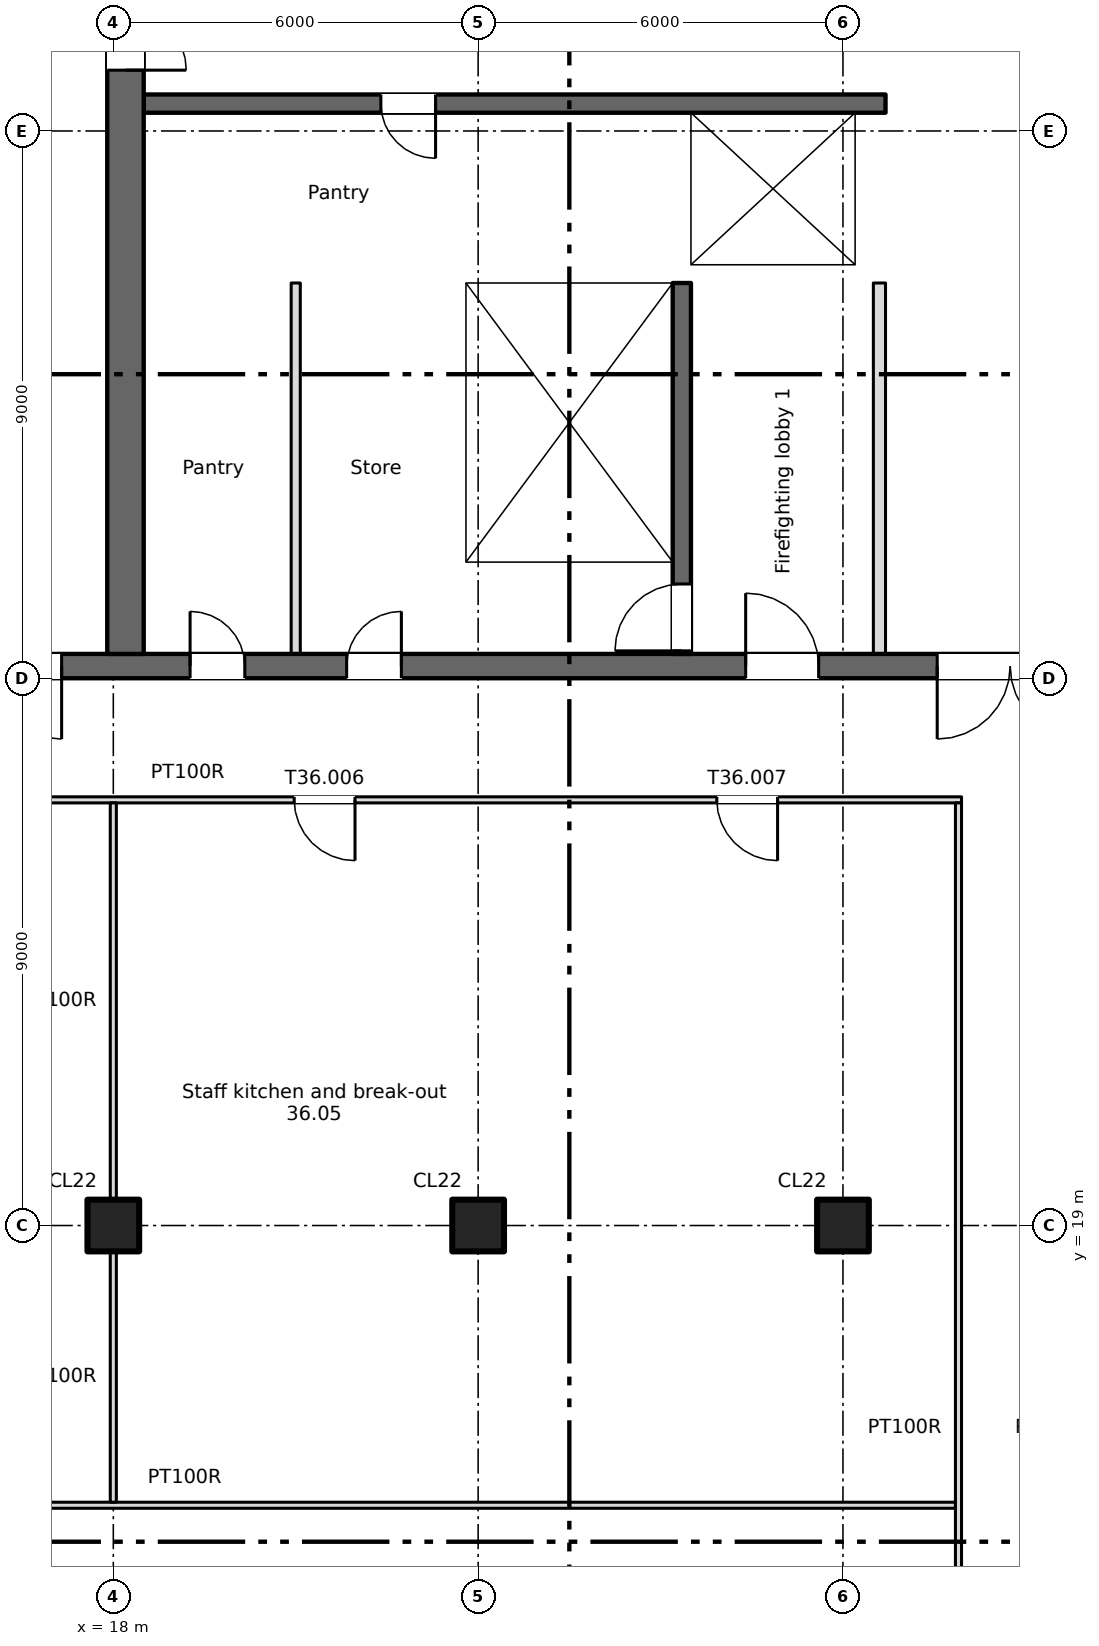
"""IFC4 building model, lengths in metres.
Left out: names, types, materials, properties, quantities, classifications, styles, units other than length and angle.
Written with IfcOpenShell. Run it as: python <this file> out.ifc"""

import sys

from ifc_helpers import new_model, si_unit, direction, frame, frame_2d, origin, origin_2d, place, context, subcontext, project, spatial, rectangle, extrude, element, fill, save


model = new_model("IFC4")
c1 = context("Model", 3, precision=1e-05, world=origin(), true_north=direction((0.0, 1.0)))
c2 = subcontext(c1, "Body", "Model", "MODEL_VIEW")
j1 = project(units=[si_unit("LENGTHUNIT", "METRE"), si_unit("PLANEANGLEUNIT", "RADIAN")], contexts=[c1])
p1 = place(None, origin())
s1 = spatial("IfcSite", under=j1, at=p1, CompositionType="ELEMENT")
p2 = place(p1, origin())
s2 = spatial("IfcBuilding", under=s1, at=p2, CompositionType="ELEMENT")
p3 = place(p2, frame((0.0, 0.0, 250.75)))
s3 = spatial("IfcBuildingStorey", under=s2, at=p3, CompositionType="ELEMENT", Elevation=250.75)
for number, where, z_axis, x_axis in (
    (1, (18.0, 19.0, 0.0), (0.0, 0.0, 1.0), (1.0, 0.0, 0.0)),
    (2, (24.0, 19.0, 0.0), (0.0, 0.0, 1.0), (1.0, 0.0, 0.0)),
    (3, (30.0, 19.0, 0.0), (0.0, 0.0, 1.0), (1.0, 0.0, 0.0)),
):
    element("IfcColumn", number, at=place(p3, frame(where, z_axis=z_axis, x_axis=x_axis)), inside=s3, PredefinedType="COLUMN", context=c2, shape_type="SweptSolid", body=[
        extrude(rectangle(XDim=0.85, YDim=0.85, at=origin_2d()), origin(), (0.0, 0.0, 1.0), 3.4),
    ])
p4 = place(p3, frame((6.5, 28.2, 0.0), z_axis=(0.0, 0.0, 1.0), x_axis=(1.0, 0.0, 0.0)))
e4 = element("IfcWall", 4, at=p4, inside=s3, PredefinedType="SHEAR", context=c2, shape_type="SweptSolid", body=[
    extrude(rectangle(XDim=58.0, YDim=0.4, at=frame_2d((29.0, 0.0))), origin(), (0.0, 0.0, 1.0), 3.4),
])
p5 = place(p4, frame((12.762, 0.0, 0.0)))
e5 = element("IfcOpeningElement", 5, at=p5, cuts=e4, PredefinedType="OPENING", context=c2, shape_type="SweptSolid", body=[
    extrude(rectangle(XDim=0.9, YDim=2.1, at=frame_2d((0.45, 1.05))), frame((0.0, 0.21, 0.0), z_axis=(0.0, -1.0, 0.0), x_axis=(1.0, 0.0, 0.0)), (0.0, 0.0, 1.0), 0.42),
])
p6 = place(p4, frame((15.337, 0.0, 0.0)))
e6 = element("IfcOpeningElement", 6, at=p6, cuts=e4, PredefinedType="OPENING", context=c2, shape_type="SweptSolid", body=[
    extrude(rectangle(XDim=0.9, YDim=2.1, at=frame_2d((0.45, 1.05))), frame((0.0, 0.21, 0.0), z_axis=(0.0, -1.0, 0.0), x_axis=(1.0, 0.0, 0.0)), (0.0, 0.0, 1.0), 0.42),
])
p7 = place(p4, frame((50.05, 0.0, 0.0)))
e7 = element("IfcOpeningElement", 7, at=p7, cuts=e4, PredefinedType="OPENING", context=c2, shape_type="SweptSolid", body=[
    extrude(rectangle(XDim=0.9, YDim=2.1, at=frame_2d((0.45, 1.05))), frame((0.0, 0.21, 0.0), z_axis=(0.0, -1.0, 0.0), x_axis=(1.0, 0.0, 0.0)), (0.0, 0.0, 1.0), 0.42),
])
p8 = place(p4, frame((0.762, 0.0, 0.0)))
e8 = element("IfcOpeningElement", 8, at=p8, cuts=e4, PredefinedType="OPENING", context=c2, shape_type="SweptSolid", body=[
    extrude(rectangle(XDim=0.9, YDim=2.1, at=frame_2d((0.45, 1.05))), frame((0.0, 0.21, 0.0), z_axis=(0.0, -1.0, 0.0), x_axis=(1.0, 0.0, 0.0)), (0.0, 0.0, 1.0), 0.42),
])
p9 = place(p4, frame((2.337, 0.0, 0.0)))
e9 = element("IfcOpeningElement", 9, at=p9, cuts=e4, PredefinedType="OPENING", context=c2, shape_type="SweptSolid", body=[
    extrude(rectangle(XDim=0.9, YDim=2.1, at=frame_2d((0.45, 1.05))), frame((0.0, 0.21, 0.0), z_axis=(0.0, -1.0, 0.0), x_axis=(1.0, 0.0, 0.0)), (0.0, 0.0, 1.0), 0.42),
])
p10 = place(p4, frame((4.9, 0.0, 0.0)))
e10 = element("IfcOpeningElement", 10, at=p10, cuts=e4, PredefinedType="OPENING", context=c2, shape_type="SweptSolid", body=[
    extrude(rectangle(XDim=1.2, YDim=2.1, at=frame_2d((0.6, 1.05))), frame((0.0, 0.21, 0.0), z_axis=(0.0, -1.0, 0.0), x_axis=(1.0, 0.0, 0.0)), (0.0, 0.0, 1.0), 0.42),
])
p11 = place(p4, frame((31.9, 0.0, 0.0)))
e11 = element("IfcOpeningElement", 11, at=p11, cuts=e4, PredefinedType="OPENING", context=c2, shape_type="SweptSolid", body=[
    extrude(rectangle(XDim=1.2, YDim=2.1, at=frame_2d((0.6, 1.05))), frame((0.0, 0.21, 0.0), z_axis=(0.0, -1.0, 0.0), x_axis=(1.0, 0.0, 0.0)), (0.0, 0.0, 1.0), 0.42),
])
p12 = place(p4, frame((55.4, 0.0, 0.0)))
e12 = element("IfcOpeningElement", 12, at=p12, cuts=e4, PredefinedType="OPENING", context=c2, shape_type="SweptSolid", body=[
    extrude(rectangle(XDim=1.2, YDim=2.1, at=frame_2d((0.6, 1.05))), frame((0.0, 0.21, 0.0), z_axis=(0.0, -1.0, 0.0), x_axis=(1.0, 0.0, 0.0)), (0.0, 0.0, 1.0), 0.42),
])
p13 = place(p4, frame((21.9, 0.0, 0.0)))
e13 = element("IfcOpeningElement", 13, at=p13, cuts=e4, PredefinedType="OPENING", context=c2, shape_type="SweptSolid", body=[
    extrude(rectangle(XDim=1.2, YDim=2.1, at=frame_2d((0.6, 1.05))), frame((0.0, 0.21, 0.0), z_axis=(0.0, -1.0, 0.0), x_axis=(1.0, 0.0, 0.0)), (0.0, 0.0, 1.0), 0.42),
])
p14 = place(p4, frame((41.9, 0.0, 0.0)))
e14 = element("IfcOpeningElement", 14, at=p14, cuts=e4, PredefinedType="OPENING", context=c2, shape_type="SweptSolid", body=[
    extrude(rectangle(XDim=1.2, YDim=2.1, at=frame_2d((0.6, 1.05))), frame((0.0, 0.21, 0.0), z_axis=(0.0, -1.0, 0.0), x_axis=(1.0, 0.0, 0.0)), (0.0, 0.0, 1.0), 0.42),
])
p15 = place(p4, frame((25.05, 0.0, 0.0)))
e15 = element("IfcOpeningElement", 15, at=p15, cuts=e4, PredefinedType="OPENING", context=c2, shape_type="SweptSolid", body=[
    extrude(rectangle(XDim=2.4, YDim=2.1, at=frame_2d((1.2, 1.05))), frame((0.0, 0.21, 0.0), z_axis=(0.0, -1.0, 0.0), x_axis=(1.0, 0.0, 0.0)), (0.0, 0.0, 1.0), 0.42),
])
p16 = place(p4, frame((37.55, 0.0, 0.0)))
e16 = element("IfcOpeningElement", 16, at=p16, cuts=e4, PredefinedType="OPENING", context=c2, shape_type="SweptSolid", body=[
    extrude(rectangle(XDim=2.4, YDim=2.1, at=frame_2d((1.2, 1.05))), frame((0.0, 0.21, 0.0), z_axis=(0.0, -1.0, 0.0), x_axis=(1.0, 0.0, 0.0)), (0.0, 0.0, 1.0), 0.42),
])
p17 = place(p4, frame((8.25, 0.0, 0.0)))
e17 = element("IfcOpeningElement", 17, at=p17, cuts=e4, PredefinedType="OPENING", context=c2, shape_type="SweptSolid", body=[
    extrude(rectangle(XDim=2.4, YDim=2.1, at=frame_2d((1.2, 1.05))), frame((0.0, 0.21, 0.0), z_axis=(0.0, -1.0, 0.0), x_axis=(1.0, 0.0, 0.0)), (0.0, 0.0, 1.0), 0.42),
])
p18 = place(p4, frame((29.05, 0.0, 0.0)))
e18 = element("IfcOpeningElement", 18, at=p18, cuts=e4, PredefinedType="OPENING", context=c2, shape_type="SweptSolid", body=[
    extrude(rectangle(XDim=0.9, YDim=2.1, at=frame_2d((0.45, 1.05))), frame((0.0, 0.21, 0.0), z_axis=(0.0, -1.0, 0.0), x_axis=(1.0, 0.0, 0.0)), (0.0, 0.0, 1.0), 0.42),
])
p19 = place(p4, frame((35.05, 0.0, 0.0)))
e19 = element("IfcOpeningElement", 19, at=p19, cuts=e4, PredefinedType="OPENING", context=c2, shape_type="SweptSolid", body=[
    extrude(rectangle(XDim=0.9, YDim=2.1, at=frame_2d((0.45, 1.05))), frame((0.0, 0.21, 0.0), z_axis=(0.0, -1.0, 0.0), x_axis=(1.0, 0.0, 0.0)), (0.0, 0.0, 1.0), 0.42),
])
p20 = place(p3, frame((18.2, 28.4, 0.0), z_axis=(0.0, 0.0, 1.0), x_axis=(0.0, 1.0, 0.0)))
e20 = element("IfcWall", 20, at=p20, inside=s3, PredefinedType="SHEAR", context=c2, shape_type="SweptSolid", body=[
    extrude(rectangle(XDim=17.0, YDim=0.6, at=frame_2d((8.5, 0.0))), origin(), (0.0, 0.0, 1.0), 3.4),
])
p21 = place(p20, frame((9.6, 0.0, 0.0)))
e21 = element("IfcOpeningElement", 21, at=p21, cuts=e20, PredefinedType="OPENING", context=c2, shape_type="SweptSolid", body=[
    extrude(rectangle(XDim=2.0, YDim=2.1, at=frame_2d((1.0, 1.05))), frame((0.0, 0.31, 0.0), z_axis=(0.0, -1.0, 0.0), x_axis=(1.0, 0.0, 0.0)), (0.0, 0.0, 1.0), 0.62),
])
p22 = place(p20, frame((15.45, 0.0, 0.0)))
e22 = element("IfcOpeningElement", 22, at=p22, cuts=e20, PredefinedType="OPENING", context=c2, shape_type="SweptSolid", body=[
    extrude(rectangle(XDim=1.2, YDim=2.1, at=frame_2d((0.6, 1.05))), frame((0.0, 0.31, 0.0), z_axis=(0.0, -1.0, 0.0), x_axis=(1.0, 0.0, 0.0)), (0.0, 0.0, 1.0), 0.62),
])
p23 = place(p3, frame((23.65, 28.4, 0.0), z_axis=(0.0, 0.0, 1.0), x_axis=(0.0, 1.0, 0.0)))
e23 = element("IfcWall", 23, at=p23, inside=s3, PredefinedType="SHEAR", context=c2, shape_type="SweptSolid", body=[
    extrude(rectangle(XDim=6.1, YDim=0.3, at=frame_2d((3.05, 0.0))), origin(), (0.0, 0.0, 1.0), 3.4),
])
p24 = place(p3, frame((27.35, 28.4, 0.0), z_axis=(0.0, 0.0, 1.0), x_axis=(0.0, 1.0, 0.0)))
e24 = element("IfcWall", 24, at=p24, inside=s3, PredefinedType="SHEAR", context=c2, shape_type="SweptSolid", body=[
    extrude(rectangle(XDim=6.1, YDim=0.3, at=frame_2d((3.05, 0.0))), origin(), (0.0, 0.0, 1.0), 3.4),
])
p25 = place(p24, frame((0.05, 0.0, 0.0)))
e25 = element("IfcOpeningElement", 25, at=p25, cuts=e24, PredefinedType="OPENING", context=c2, shape_type="SweptSolid", body=[
    extrude(rectangle(XDim=1.1, YDim=2.1, at=frame_2d((0.55, 1.05))), frame((0.0, 0.16, 0.0), z_axis=(0.0, -1.0, 0.0), x_axis=(1.0, 0.0, 0.0)), (0.0, 0.0, 1.0), 0.32),
])
p26 = place(p3, frame((18.5, 34.65, 0.0), z_axis=(0.0, 0.0, 1.0), x_axis=(1.0, 0.0, 0.0)))
e26 = element("IfcWall", 26, at=p26, inside=s3, PredefinedType="SHEAR", context=c2, shape_type="SweptSolid", body=[
    extrude(rectangle(XDim=12.2, YDim=0.3, at=frame_2d((6.1, 0.0))), origin(), (0.0, 0.0, 1.0), 3.4),
])
p27 = place(p26, frame((9.8, 0.0, 0.0)))
e27 = element("IfcOpeningElement", 27, at=p27, cuts=e26, PredefinedType="OPENING", context=c2, shape_type="SweptSolid", body=[
    extrude(rectangle(XDim=1.1, YDim=2.1, at=frame_2d((0.55, 1.05))), frame((0.0, 0.16, 0.0), z_axis=(0.0, -1.0, 0.0), x_axis=(1.0, 0.0, 0.0)), (0.0, 0.0, 1.0), 0.32),
])
p28 = place(p3, frame((30.7, 37.45, 0.0), z_axis=(0.0, 0.0, 1.0), x_axis=(-1.0, 0.0, 0.0)))
e28 = element("IfcWall", 28, at=p28, inside=s3, PredefinedType="SHEAR", context=c2, shape_type="SweptSolid", body=[
    extrude(rectangle(XDim=12.2, YDim=0.3, at=frame_2d((6.1, 0.0))), origin(), (0.0, 0.0, 1.0), 3.4),
])
p29 = place(p28, frame((7.4, 0.0, 0.0)))
e29 = element("IfcOpeningElement", 29, at=p29, cuts=e28, PredefinedType="OPENING", context=c2, shape_type="SweptSolid", body=[
    extrude(rectangle(XDim=0.9, YDim=2.1, at=frame_2d((0.45, 1.05))), frame((0.0, 0.16, 0.0), z_axis=(0.0, -1.0, 0.0), x_axis=(1.0, 0.0, 0.0)), (0.0, 0.0, 1.0), 0.32),
])
p30 = place(p3, frame((27.35, 34.8, 0.0), z_axis=(0.0, 0.0, 1.0), x_axis=(0.0, 1.0, 0.0)))
e30 = element("IfcWall", 30, at=p30, inside=s3, PredefinedType="SHEAR", context=c2, shape_type="SweptSolid", body=[
    extrude(rectangle(XDim=2.5, YDim=0.3, at=frame_2d((1.25, 0.0))), origin(), (0.0, 0.0, 1.0), 3.4),
])
p31 = place(p3, frame((30.45, 34.8, 0.0), z_axis=(0.0, 0.0, 1.0), x_axis=(0.0, 1.0, 0.0)))
e31 = element("IfcWall", 31, at=p31, inside=s3, PredefinedType="SHEAR", context=c2, shape_type="SweptSolid", body=[
    extrude(rectangle(XDim=2.5, YDim=0.5, at=frame_2d((1.25, 0.0))), origin(), (0.0, 0.0, 1.0), 3.4),
])
p32 = place(p3, frame((30.6, 28.4, 0.0), z_axis=(0.0, 0.0, 1.0), x_axis=(0.0, 1.0, 0.0)))
e32 = element("IfcWall", 32, at=p32, inside=s3, PredefinedType="PARTITIONING", context=c2, shape_type="SweptSolid", body=[
    extrude(rectangle(XDim=6.1, YDim=0.2, at=frame_2d((3.05, 0.0))), origin(), (0.0, 0.0, 1.0), 3.4),
])
p33 = place(p3, frame((21.0, 28.4, 0.0), z_axis=(0.0, 0.0, 1.0), x_axis=(0.0, 1.0, 0.0)))
e33 = element("IfcWall", 33, at=p33, inside=s3, PredefinedType="PARTITIONING", context=c2, shape_type="SweptSolid", body=[
    extrude(rectangle(XDim=6.1, YDim=0.15, at=frame_2d((3.05, 0.0))), origin(), (0.0, 0.0, 1.0), 3.4),
])
p34 = place(p3, frame((6.5, 14.4, 0.0), z_axis=(0.0, 0.0, 1.0), x_axis=(1.0, 0.0, 0.0)))
e34 = element("IfcWall", 34, at=p34, inside=s3, PredefinedType="PARTITIONING", context=c2, shape_type="SweptSolid", body=[
    extrude(rectangle(XDim=25.35, YDim=0.1, at=frame_2d((12.675, 0.0))), origin(), (0.0, 0.0, 1.0), 3.4),
])
p35 = place(p3, frame((6.5, 26.0, 0.0), z_axis=(0.0, 0.0, 1.0), x_axis=(1.0, 0.0, 0.0)))
e35 = element("IfcWall", 35, at=p35, inside=s3, PredefinedType="PARTITIONING", context=c2, shape_type="SweptSolid", body=[
    extrude(rectangle(XDim=25.45, YDim=0.1, at=frame_2d((12.725, 0.0))), origin(), (0.0, 0.0, 1.0), 3.4),
])
p36 = place(p35, frame((4.85, 0.0, 0.0)))
e36 = element("IfcOpeningElement", 36, at=p36, cuts=e35, PredefinedType="OPENING", context=c2, shape_type="SweptSolid", body=[
    extrude(rectangle(XDim=1.8, YDim=2.1, at=frame_2d((0.9, 1.05))), frame((0.0, 0.06, 0.0), z_axis=(0.0, -1.0, 0.0), x_axis=(1.0, 0.0, 0.0)), (0.0, 0.0, 1.0), 0.12),
])
p37 = place(p35, frame((14.475, 0.0, 0.0)))
e37 = element("IfcOpeningElement", 37, at=p37, cuts=e35, PredefinedType="OPENING", context=c2, shape_type="SweptSolid", body=[
    extrude(rectangle(XDim=1.0, YDim=2.1, at=frame_2d((0.5, 1.05))), frame((0.0, 0.06, 0.0), z_axis=(0.0, -1.0, 0.0), x_axis=(1.0, 0.0, 0.0)), (0.0, 0.0, 1.0), 0.12),
])
p38 = place(p35, frame((21.425, 0.0, 0.0)))
e38 = element("IfcOpeningElement", 38, at=p38, cuts=e35, PredefinedType="OPENING", context=c2, shape_type="SweptSolid", body=[
    extrude(rectangle(XDim=1.0, YDim=2.1, at=frame_2d((0.5, 1.05))), frame((0.0, 0.06, 0.0), z_axis=(0.0, -1.0, 0.0), x_axis=(1.0, 0.0, 0.0)), (0.0, 0.0, 1.0), 0.12),
])
p39 = place(p3, frame((18.0, 14.45, 0.0), z_axis=(0.0, 0.0, 1.0), x_axis=(0.0, 1.0, 0.0)))
e39 = element("IfcWall", 39, at=p39, inside=s3, PredefinedType="PARTITIONING", context=c2, shape_type="SweptSolid", body=[
    extrude(rectangle(XDim=4.125, YDim=0.1, at=frame_2d((2.062, 0.0))), origin(), (0.0, 0.0, 1.0), 3.4),
])
p40 = place(p3, frame((18.0, 19.425, 0.0), z_axis=(0.0, 0.0, 1.0), x_axis=(0.0, 1.0, 0.0)))
e40 = element("IfcWall", 40, at=p40, inside=s3, PredefinedType="PARTITIONING", context=c2, shape_type="SweptSolid", body=[
    extrude(rectangle(XDim=6.525, YDim=0.1, at=frame_2d((3.262, 0.0))), origin(), (0.0, 0.0, 1.0), 3.4),
])
p41 = place(p3, frame((31.9, 5.4, 0.0), z_axis=(0.0, 0.0, 1.0), x_axis=(0.0, 1.0, 0.0)))
e41 = element("IfcWall", 41, at=p41, inside=s3, PredefinedType="PARTITIONING", context=c2, shape_type="SweptSolid", body=[
    extrude(rectangle(XDim=20.55, YDim=0.1, at=frame_2d((10.275, 0.0))), origin(), (0.0, 0.0, 1.0), 3.4),
])
p42 = place(p41, frame((1.65, 0.0, 0.0)))
e42 = element("IfcOpeningElement", 42, at=p42, cuts=e41, PredefinedType="OPENING", context=c2, shape_type="SweptSolid", body=[
    extrude(rectangle(XDim=1.2, YDim=2.1, at=frame_2d((0.6, 1.05))), frame((0.0, 0.06, 0.0), z_axis=(0.0, -1.0, 0.0), x_axis=(1.0, 0.0, 0.0)), (0.0, 0.0, 1.0), 0.12),
])
p43 = place(p41, frame((6.15, 0.0, 0.0)))
e43 = element("IfcOpeningElement", 43, at=p43, cuts=e41, PredefinedType="OPENING", context=c2, shape_type="SweptSolid", body=[
    extrude(rectangle(XDim=1.2, YDim=2.1, at=frame_2d((0.6, 1.05))), frame((0.0, 0.06, 0.0), z_axis=(0.0, -1.0, 0.0), x_axis=(1.0, 0.0, 0.0)), (0.0, 0.0, 1.0), 0.12),
])
p44 = place(p5, origin())
e44 = element("IfcDoor", 44, at=p44, inside=s3, OperationType="SINGLE_SWING_LEFT", PredefinedType="DOOR", context=c2, shape_type="SweptSolid", body=[
    extrude(rectangle(XDim=0.9, YDim=2.1, at=frame_2d((0.45, 1.05))), frame((0.0, 0.025, 0.0), z_axis=(0.0, -1.0, 0.0), x_axis=(1.0, 0.0, 0.0)), (0.0, 0.0, 1.0), 0.05),
])
fill(e5, e44)
p45 = place(p6, origin())
e45 = element("IfcDoor", 45, at=p45, inside=s3, OperationType="SINGLE_SWING_RIGHT", PredefinedType="DOOR", context=c2, shape_type="SweptSolid", body=[
    extrude(rectangle(XDim=0.9, YDim=2.1, at=frame_2d((0.45, 1.05))), frame((0.0, 0.025, 0.0), z_axis=(0.0, -1.0, 0.0), x_axis=(1.0, 0.0, 0.0)), (0.0, 0.0, 1.0), 0.05),
])
fill(e6, e45)
p46 = place(p29, origin())
e46 = element("IfcDoor", 46, at=p46, inside=s3, OperationType="SINGLE_SWING_LEFT", PredefinedType="DOOR", context=c2, shape_type="SweptSolid", body=[
    extrude(rectangle(XDim=0.9, YDim=2.1, at=frame_2d((0.45, 1.05))), frame((0.0, 0.025, 0.0), z_axis=(0.0, -1.0, 0.0), x_axis=(1.0, 0.0, 0.0)), (0.0, 0.0, 1.0), 0.05),
])
fill(e29, e46)
p47 = place(p27, origin())
e47 = element("IfcDoor", 47, at=p47, inside=s3, OperationType="SLIDING_TO_LEFT", PredefinedType="DOOR", context=c2, shape_type="SweptSolid", body=[
    extrude(rectangle(XDim=1.1, YDim=2.1, at=frame_2d((0.55, 1.05))), frame((0.0, 0.025, 0.0), z_axis=(0.0, -1.0, 0.0), x_axis=(1.0, 0.0, 0.0)), (0.0, 0.0, 1.0), 0.05),
])
fill(e27, e47)
p48 = place(p25, origin())
e48 = element("IfcDoor", 48, at=p48, inside=s3, OperationType="SINGLE_SWING_LEFT", PredefinedType="DOOR", context=c2, shape_type="SweptSolid", body=[
    extrude(rectangle(XDim=1.1, YDim=2.1, at=frame_2d((0.55, 1.05))), frame((0.0, 0.025, 0.0), z_axis=(0.0, -1.0, 0.0), x_axis=(1.0, 0.0, 0.0)), (0.0, 0.0, 1.0), 0.05),
])
fill(e25, e48)
p49 = place(p13, origin())
e49 = element("IfcDoor", 49, at=p49, inside=s3, OperationType="SINGLE_SWING_LEFT", PredefinedType="DOOR", context=c2, shape_type="SweptSolid", body=[
    extrude(rectangle(XDim=1.2, YDim=2.1, at=frame_2d((0.6, 1.05))), frame((0.0, 0.025, 0.0), z_axis=(0.0, -1.0, 0.0), x_axis=(1.0, 0.0, 0.0)), (0.0, 0.0, 1.0), 0.05),
])
fill(e13, e49)
p50 = place(p15, origin())
e50 = element("IfcDoor", 50, at=p50, inside=s3, OperationType="DOUBLE_DOOR_SINGLE_SWING", PredefinedType="DOOR", context=c2, shape_type="SweptSolid", body=[
    extrude(rectangle(XDim=2.4, YDim=2.1, at=frame_2d((1.2, 1.05))), frame((0.0, 0.025, 0.0), z_axis=(0.0, -1.0, 0.0), x_axis=(1.0, 0.0, 0.0)), (0.0, 0.0, 1.0), 0.05),
])
fill(e15, e50)
p51 = place(p17, origin())
e51 = element("IfcDoor", 51, at=p51, inside=s3, OperationType="DOUBLE_DOOR_SINGLE_SWING", PredefinedType="DOOR", context=c2, shape_type="SweptSolid", body=[
    extrude(rectangle(XDim=2.4, YDim=2.1, at=frame_2d((1.2, 1.05))), frame((0.0, 0.025, 0.0), z_axis=(0.0, -1.0, 0.0), x_axis=(1.0, 0.0, 0.0)), (0.0, 0.0, 1.0), 0.05),
])
fill(e17, e51)
p52 = place(p21, origin())
e52 = element("IfcDoor", 52, at=p52, inside=s3, OperationType="DOUBLE_DOOR_SINGLE_SWING", PredefinedType="DOOR", context=c2, shape_type="SweptSolid", body=[
    extrude(rectangle(XDim=2.0, YDim=2.1, at=frame_2d((1.0, 1.05))), frame((0.0, 0.025, 0.0), z_axis=(0.0, -1.0, 0.0), x_axis=(1.0, 0.0, 0.0)), (0.0, 0.0, 1.0), 0.05),
])
fill(e21, e52)
p53 = place(p37, origin())
e53 = element("IfcDoor", 53, at=p53, inside=s3, OperationType="SINGLE_SWING_RIGHT", PredefinedType="DOOR", context=c2, shape_type="SweptSolid", body=[
    extrude(rectangle(XDim=1.0, YDim=2.1, at=frame_2d((0.5, 1.05))), frame((0.0, 0.025, 0.0), z_axis=(0.0, -1.0, 0.0), x_axis=(1.0, 0.0, 0.0)), (0.0, 0.0, 1.0), 0.05),
])
fill(e37, e53)
p54 = place(p38, origin())
e54 = element("IfcDoor", 54, at=p54, inside=s3, OperationType="SINGLE_SWING_RIGHT", PredefinedType="DOOR", context=c2, shape_type="SweptSolid", body=[
    extrude(rectangle(XDim=1.0, YDim=2.1, at=frame_2d((0.5, 1.05))), frame((0.0, 0.025, 0.0), z_axis=(0.0, -1.0, 0.0), x_axis=(1.0, 0.0, 0.0)), (0.0, 0.0, 1.0), 0.05),
])
fill(e38, e54)
save(model, sys.argv[1])
